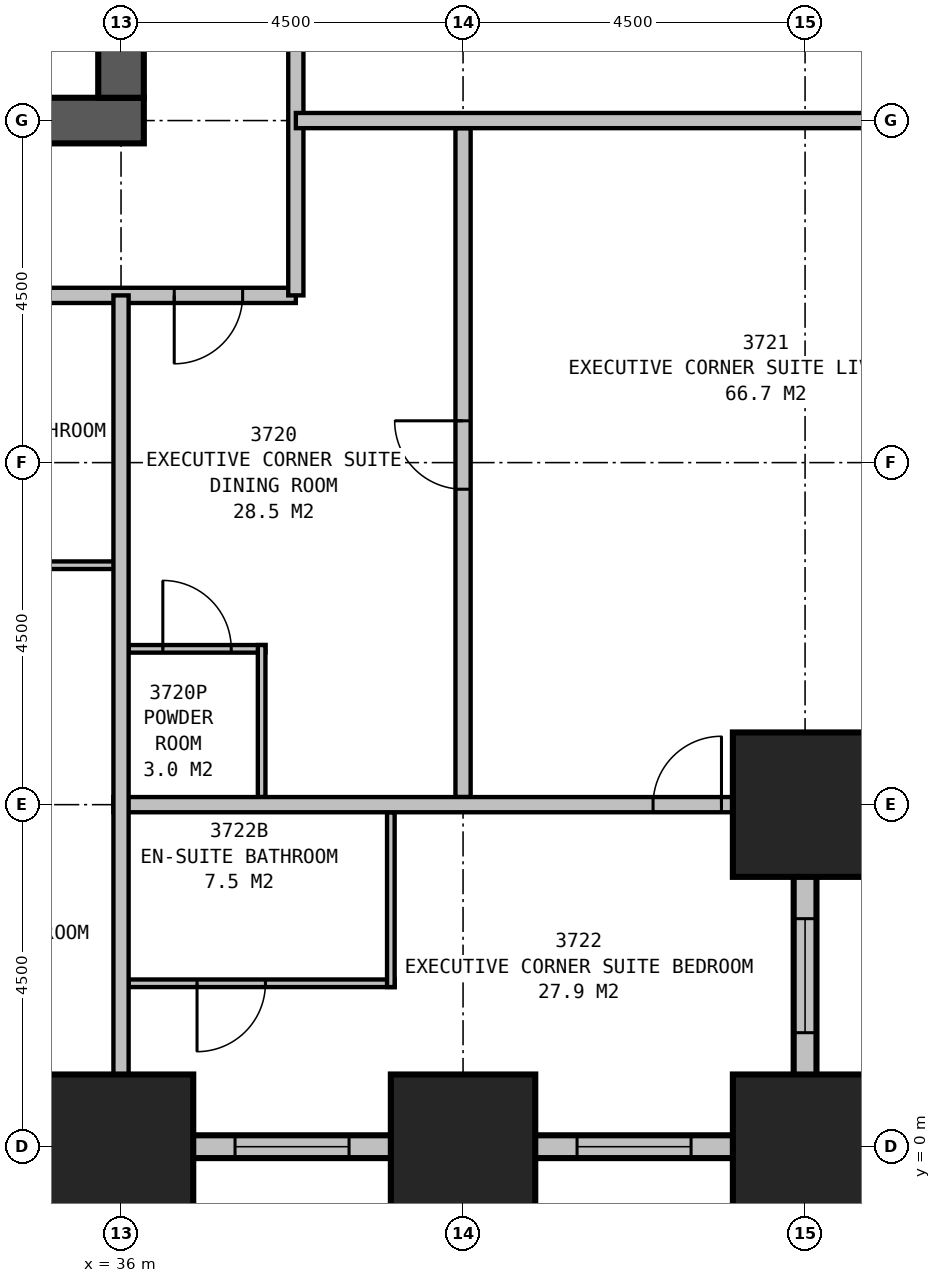
"""IFC4 building model, lengths in metres.
Left out: names, types, materials, properties, quantities, classifications, styles, units other than length and angle.
Written with IfcOpenShell. Run it as: python <this file> out.ifc"""

import sys

from ifc_helpers import new_model, si_unit, direction, frame, frame_2d, origin, origin_2d, place, context, subcontext, project, spatial, rectangle, extrude, element, fill, save


model = new_model("IFC4")
c1 = context("Model", 3, precision=1e-05, world=origin(), true_north=direction((0.0, 1.0)))
c2 = subcontext(c1, "Body", "Model", "MODEL_VIEW")
j1 = project(units=[si_unit("LENGTHUNIT", "METRE"), si_unit("PLANEANGLEUNIT", "RADIAN")], contexts=[c1])
p1 = place(None, origin())
s1 = spatial("IfcSite", under=j1, at=p1, CompositionType="ELEMENT")
p2 = place(p1, origin())
s2 = spatial("IfcBuilding", under=s1, at=p2, CompositionType="ELEMENT")
p3 = place(p2, frame((0.0, 0.0, 142.4)))
s3 = spatial("IfcBuildingStorey", under=s2, at=p3, CompositionType="ELEMENT", Elevation=142.4)
for number, where, z_axis, x_axis in (
    (1, (36.0, 0.0, 0.0), (0.0, 0.0, 1.0), (1.0, 0.0, 0.0)),
    (2, (40.5, 0.0, 0.0), (0.0, 0.0, 1.0), (1.0, 0.0, 0.0)),
    (3, (45.0, 0.0, 0.0), (0.0, 0.0, 1.0), (1.0, 0.0, 0.0)),
    (4, (45.0, 4.5, 0.0), (0.0, 0.0, 1.0), (1.0, 0.0, 0.0)),
):
    element("IfcColumn", number, at=place(p3, frame(where, z_axis=z_axis, x_axis=x_axis)), inside=s3, PredefinedType="COLUMN", context=c2, shape_type="SweptSolid", body=[
        extrude(rectangle(XDim=1.9, YDim=1.9, at=origin_2d()), origin(), (0.0, 0.0, 1.0), 3.5),
    ])
p4 = place(p3, frame((13.2, 13.5, 0.0), z_axis=(0.0, 0.0, 1.0), x_axis=(1.0, 0.0, 0.0)))
e5 = element("IfcWall", 5, at=p4, inside=s3, PredefinedType="SHEAR", context=c2, shape_type="SweptSolid", body=[
    extrude(rectangle(XDim=23.1, YDim=0.6, at=frame_2d((11.55, 0.0))), origin(), (0.0, 0.0, 1.0), 3.5),
])
p5 = place(p3, frame((36.0, 13.8, 0.0), z_axis=(0.0, 0.0, 1.0), x_axis=(0.0, 1.0, 0.0)))
e6 = element("IfcWall", 6, at=p5, inside=s3, PredefinedType="SHEAR", context=c2, shape_type="SweptSolid", body=[
    extrude(rectangle(XDim=2.7, YDim=0.6, at=frame_2d((1.35, 0.0))), origin(), (0.0, 0.0, 1.0), 3.5),
])
p6 = place(p3, frame((4.35, 0.0, 0.0), z_axis=(0.0, 0.0, 1.0), x_axis=(1.0, 0.0, 0.0)))
e7 = element("IfcWall", 7, at=p6, inside=s3, PredefinedType="STANDARD", context=c2, shape_type="SweptSolid", body=[
    extrude(rectangle(XDim=40.8, YDim=0.3, at=frame_2d((20.4, 0.0))), origin(), (0.0, 0.0, 1.0), 2.1),
])
p7 = place(p6, frame((1.65, 0.0, 0.5)))
e8 = element("IfcOpeningElement", 8, at=p7, cuts=e7, PredefinedType="OPENING", context=c2, shape_type="SweptSolid", body=[
    extrude(rectangle(XDim=1.5, YDim=1.4, at=frame_2d((0.75, 0.7))), frame((0.0, 0.16, 0.0), z_axis=(0.0, -1.0, 0.0), x_axis=(1.0, 0.0, 0.0)), (0.0, 0.0, 1.0), 0.32),
])
p8 = place(p6, frame((6.15, 0.0, 0.5)))
e9 = element("IfcOpeningElement", 9, at=p8, cuts=e7, PredefinedType="OPENING", context=c2, shape_type="SweptSolid", body=[
    extrude(rectangle(XDim=1.5, YDim=1.4, at=frame_2d((0.75, 0.7))), frame((0.0, 0.16, 0.0), z_axis=(0.0, -1.0, 0.0), x_axis=(1.0, 0.0, 0.0)), (0.0, 0.0, 1.0), 0.32),
])
p9 = place(p6, frame((10.65, 0.0, 0.5)))
e10 = element("IfcOpeningElement", 10, at=p9, cuts=e7, PredefinedType="OPENING", context=c2, shape_type="SweptSolid", body=[
    extrude(rectangle(XDim=1.5, YDim=1.4, at=frame_2d((0.75, 0.7))), frame((0.0, 0.16, 0.0), z_axis=(0.0, -1.0, 0.0), x_axis=(1.0, 0.0, 0.0)), (0.0, 0.0, 1.0), 0.32),
])
p10 = place(p6, frame((15.15, 0.0, 0.5)))
e11 = element("IfcOpeningElement", 11, at=p10, cuts=e7, PredefinedType="OPENING", context=c2, shape_type="SweptSolid", body=[
    extrude(rectangle(XDim=1.5, YDim=1.4, at=frame_2d((0.75, 0.7))), frame((0.0, 0.16, 0.0), z_axis=(0.0, -1.0, 0.0), x_axis=(1.0, 0.0, 0.0)), (0.0, 0.0, 1.0), 0.32),
])
p11 = place(p6, frame((19.65, 0.0, 0.5)))
e12 = element("IfcOpeningElement", 12, at=p11, cuts=e7, PredefinedType="OPENING", context=c2, shape_type="SweptSolid", body=[
    extrude(rectangle(XDim=1.5, YDim=1.4, at=frame_2d((0.75, 0.7))), frame((0.0, 0.16, 0.0), z_axis=(0.0, -1.0, 0.0), x_axis=(1.0, 0.0, 0.0)), (0.0, 0.0, 1.0), 0.32),
])
p12 = place(p6, frame((24.15, 0.0, 0.5)))
e13 = element("IfcOpeningElement", 13, at=p12, cuts=e7, PredefinedType="OPENING", context=c2, shape_type="SweptSolid", body=[
    extrude(rectangle(XDim=1.5, YDim=1.4, at=frame_2d((0.75, 0.7))), frame((0.0, 0.16, 0.0), z_axis=(0.0, -1.0, 0.0), x_axis=(1.0, 0.0, 0.0)), (0.0, 0.0, 1.0), 0.32),
])
p13 = place(p6, frame((28.65, 0.0, 0.5)))
e14 = element("IfcOpeningElement", 14, at=p13, cuts=e7, PredefinedType="OPENING", context=c2, shape_type="SweptSolid", body=[
    extrude(rectangle(XDim=1.5, YDim=1.4, at=frame_2d((0.75, 0.7))), frame((0.0, 0.16, 0.0), z_axis=(0.0, -1.0, 0.0), x_axis=(1.0, 0.0, 0.0)), (0.0, 0.0, 1.0), 0.32),
])
p14 = place(p6, frame((33.15, 0.0, 0.5)))
e15 = element("IfcOpeningElement", 15, at=p14, cuts=e7, PredefinedType="OPENING", context=c2, shape_type="SweptSolid", body=[
    extrude(rectangle(XDim=1.5, YDim=1.4, at=frame_2d((0.75, 0.7))), frame((0.0, 0.16, 0.0), z_axis=(0.0, -1.0, 0.0), x_axis=(1.0, 0.0, 0.0)), (0.0, 0.0, 1.0), 0.32),
])
p15 = place(p6, frame((37.65, 0.0, 0.5)))
e16 = element("IfcOpeningElement", 16, at=p15, cuts=e7, PredefinedType="OPENING", context=c2, shape_type="SweptSolid", body=[
    extrude(rectangle(XDim=1.5, YDim=1.4, at=frame_2d((0.75, 0.7))), frame((0.0, 0.16, 0.0), z_axis=(0.0, -1.0, 0.0), x_axis=(1.0, 0.0, 0.0)), (0.0, 0.0, 1.0), 0.32),
])
p16 = place(p3, frame((45.0, -0.15, 0.0), z_axis=(0.0, 0.0, 1.0), x_axis=(0.0, 1.0, 0.0)))
e17 = element("IfcWall", 17, at=p16, inside=s3, PredefinedType="STANDARD", context=c2, shape_type="SweptSolid", body=[
    extrude(rectangle(XDim=4.8, YDim=0.3, at=frame_2d((2.4, 0.0))), origin(), (0.0, 0.0, 1.0), 2.1),
])
p17 = place(p16, frame((1.65, 0.0, 0.5)))
e18 = element("IfcOpeningElement", 18, at=p17, cuts=e17, PredefinedType="OPENING", context=c2, shape_type="SweptSolid", body=[
    extrude(rectangle(XDim=1.5, YDim=1.4, at=frame_2d((0.75, 0.7))), frame((0.0, 0.16, 0.0), z_axis=(0.0, -1.0, 0.0), x_axis=(1.0, 0.0, 0.0)), (0.0, 0.0, 1.0), 0.32),
])
p18 = place(p3, frame((44.85, 4.5, 0.0), z_axis=(0.0, 0.0, 1.0), x_axis=(1.0, 0.0, 0.0)))
e19 = element("IfcWall", 19, at=p18, inside=s3, PredefinedType="STANDARD", context=c2, shape_type="SweptSolid", body=[
    extrude(rectangle(XDim=4.3, YDim=0.3, at=frame_2d((2.15, 0.0))), origin(), (0.0, 0.0, 1.0), 2.1),
])
p19 = place(p18, frame((1.4, 0.0, 0.5)))
e20 = element("IfcOpeningElement", 20, at=p19, cuts=e19, PredefinedType="OPENING", context=c2, shape_type="SweptSolid", body=[
    extrude(rectangle(XDim=1.5, YDim=1.4, at=frame_2d((0.75, 0.7))), frame((0.0, 0.16, 0.0), z_axis=(0.0, -1.0, 0.0), x_axis=(1.0, 0.0, 0.0)), (0.0, 0.0, 1.0), 0.32),
])
p20 = place(p3, frame((49.017, 4.351, 0.0), z_axis=(0.0, 0.0, 1.0), x_axis=(-0.110433201132, 0.993883548555, 0.0)))
e21 = element("IfcWall", 21, at=p20, inside=s3, PredefinedType="STANDARD", context=c2, shape_type="SweptSolid", body=[
    extrude(rectangle(XDim=31.994, YDim=0.3, at=frame_2d((15.997, 0.0))), origin(), (0.0, 0.0, 1.0), 2.1),
])
p21 = place(p20, frame((1.664, 0.0, 0.5)))
e22 = element("IfcOpeningElement", 22, at=p21, cuts=e21, PredefinedType="OPENING", context=c2, shape_type="SweptSolid", body=[
    extrude(rectangle(XDim=1.5, YDim=1.4, at=frame_2d((0.75, 0.7))), frame((0.0, 0.16, 0.0), z_axis=(0.0, -1.0, 0.0), x_axis=(1.0, 0.0, 0.0)), (0.0, 0.0, 1.0), 0.32),
])
p22 = place(p20, frame((6.192, 0.0, 0.5)))
e23 = element("IfcOpeningElement", 23, at=p22, cuts=e21, PredefinedType="OPENING", context=c2, shape_type="SweptSolid", body=[
    extrude(rectangle(XDim=1.5, YDim=1.4, at=frame_2d((0.75, 0.7))), frame((0.0, 0.16, 0.0), z_axis=(0.0, -1.0, 0.0), x_axis=(1.0, 0.0, 0.0)), (0.0, 0.0, 1.0), 0.32),
])
p23 = place(p20, frame((10.719, 0.0, 0.5)))
e24 = element("IfcOpeningElement", 24, at=p23, cuts=e21, PredefinedType="OPENING", context=c2, shape_type="SweptSolid", body=[
    extrude(rectangle(XDim=1.5, YDim=1.4, at=frame_2d((0.75, 0.7))), frame((0.0, 0.16, 0.0), z_axis=(0.0, -1.0, 0.0), x_axis=(1.0, 0.0, 0.0)), (0.0, 0.0, 1.0), 0.32),
])
p24 = place(p20, frame((15.247, 0.0, 0.5)))
e25 = element("IfcOpeningElement", 25, at=p24, cuts=e21, PredefinedType="OPENING", context=c2, shape_type="SweptSolid", body=[
    extrude(rectangle(XDim=1.5, YDim=1.4, at=frame_2d((0.75, 0.7))), frame((0.0, 0.16, 0.0), z_axis=(0.0, -1.0, 0.0), x_axis=(1.0, 0.0, 0.0)), (0.0, 0.0, 1.0), 0.32),
])
p25 = place(p20, frame((19.775, 0.0, 0.5)))
e26 = element("IfcOpeningElement", 26, at=p25, cuts=e21, PredefinedType="OPENING", context=c2, shape_type="SweptSolid", body=[
    extrude(rectangle(XDim=1.5, YDim=1.4, at=frame_2d((0.75, 0.7))), frame((0.0, 0.16, 0.0), z_axis=(0.0, -1.0, 0.0), x_axis=(1.0, 0.0, 0.0)), (0.0, 0.0, 1.0), 0.32),
])
p26 = place(p20, frame((24.302, 0.0, 0.5)))
e27 = element("IfcOpeningElement", 27, at=p26, cuts=e21, PredefinedType="OPENING", context=c2, shape_type="SweptSolid", body=[
    extrude(rectangle(XDim=1.5, YDim=1.4, at=frame_2d((0.75, 0.7))), frame((0.0, 0.16, 0.0), z_axis=(0.0, -1.0, 0.0), x_axis=(1.0, 0.0, 0.0)), (0.0, 0.0, 1.0), 0.32),
])
p27 = place(p20, frame((28.83, 0.0, 0.5)))
e28 = element("IfcOpeningElement", 28, at=p27, cuts=e21, PredefinedType="OPENING", context=c2, shape_type="SweptSolid", body=[
    extrude(rectangle(XDim=1.5, YDim=1.4, at=frame_2d((0.75, 0.7))), frame((0.0, 0.16, 0.0), z_axis=(0.0, -1.0, 0.0), x_axis=(1.0, 0.0, 0.0)), (0.0, 0.0, 1.0), 0.32),
])
p28 = place(p3, frame((11.2, 11.2, 0.0), z_axis=(0.0, 0.0, 1.0), x_axis=(1.0, 0.0, 0.0)))
e29 = element("IfcWall", 29, at=p28, inside=s3, PredefinedType="PARTITIONING", context=c2, shape_type="SweptSolid", body=[
    extrude(rectangle(XDim=27.1, YDim=0.2, at=frame_2d((13.55, 0.0))), origin(), (0.0, 0.0, 1.0), 3.25),
])
p29 = place(p28, frame((4.05, 0.0, 0.0), z_axis=(0.0, 0.0, 1.0), x_axis=(-1.0, 0.0, 0.0)))
e30 = element("IfcOpeningElement", 30, at=p29, cuts=e29, PredefinedType="OPENING", context=c2, shape_type="SweptSolid", body=[
    extrude(rectangle(XDim=0.9, YDim=2.1, at=frame_2d((0.45, 1.05))), frame((0.0, 0.11, 0.0), z_axis=(0.0, -1.0, 0.0), x_axis=(1.0, 0.0, 0.0)), (0.0, 0.0, 1.0), 0.22),
])
p30 = place(p28, frame((12.65, 0.0, 0.0), z_axis=(0.0, 0.0, 1.0), x_axis=(-1.0, 0.0, 0.0)))
e31 = element("IfcOpeningElement", 31, at=p30, cuts=e29, PredefinedType="OPENING", context=c2, shape_type="SweptSolid", body=[
    extrude(rectangle(XDim=1.0, YDim=2.1, at=frame_2d((0.5, 1.05))), frame((0.0, 0.11, 0.0), z_axis=(0.0, -1.0, 0.0), x_axis=(1.0, 0.0, 0.0)), (0.0, 0.0, 1.0), 0.22),
])
p31 = place(p28, frame((19.45, 0.0, 0.0), z_axis=(0.0, 0.0, 1.0), x_axis=(-1.0, 0.0, 0.0)))
e32 = element("IfcOpeningElement", 32, at=p31, cuts=e29, PredefinedType="OPENING", context=c2, shape_type="SweptSolid", body=[
    extrude(rectangle(XDim=0.9, YDim=2.1, at=frame_2d((0.45, 1.05))), frame((0.0, 0.11, 0.0), z_axis=(0.0, -1.0, 0.0), x_axis=(1.0, 0.0, 0.0)), (0.0, 0.0, 1.0), 0.22),
])
p32 = place(p28, frame((1.6, 0.0, 0.0), z_axis=(0.0, 0.0, 1.0), x_axis=(-1.0, 0.0, 0.0)))
e33 = element("IfcOpeningElement", 33, at=p32, cuts=e29, PredefinedType="OPENING", context=c2, shape_type="SweptSolid", body=[
    extrude(rectangle(XDim=0.9, YDim=2.1, at=frame_2d((0.45, 1.05))), frame((0.0, 0.11, 0.0), z_axis=(0.0, -1.0, 0.0), x_axis=(1.0, 0.0, 0.0)), (0.0, 0.0, 1.0), 0.22),
])
p33 = place(p28, frame((26.4, 0.0, 0.0), z_axis=(0.0, 0.0, 1.0), x_axis=(-1.0, 0.0, 0.0)))
e34 = element("IfcOpeningElement", 34, at=p33, cuts=e29, PredefinedType="OPENING", context=c2, shape_type="SweptSolid", body=[
    extrude(rectangle(XDim=0.9, YDim=2.1, at=frame_2d((0.45, 1.05))), frame((0.0, 0.11, 0.0), z_axis=(0.0, -1.0, 0.0), x_axis=(1.0, 0.0, 0.0)), (0.0, 0.0, 1.0), 0.22),
])
p34 = place(p3, frame((38.3, 11.2, 0.0), z_axis=(0.0, 0.0, 1.0), x_axis=(0.0, 1.0, 0.0)))
e35 = element("IfcWall", 35, at=p34, inside=s3, PredefinedType="PARTITIONING", context=c2, shape_type="SweptSolid", body=[
    extrude(rectangle(XDim=18.1, YDim=0.2, at=frame_2d((9.05, 0.0))), origin(), (0.0, 0.0, 1.0), 3.25),
])
p35 = place(p34, frame((5.0, 0.0, 0.0), z_axis=(0.0, 0.0, 1.0), x_axis=(-1.0, 0.0, 0.0)))
e36 = element("IfcOpeningElement", 36, at=p35, cuts=e35, PredefinedType="OPENING", context=c2, shape_type="SweptSolid", body=[
    extrude(rectangle(XDim=1.0, YDim=2.1, at=frame_2d((0.5, 1.05))), frame((0.0, 0.11, 0.0), z_axis=(0.0, -1.0, 0.0), x_axis=(1.0, 0.0, 0.0)), (0.0, 0.0, 1.0), 0.22),
])
p36 = place(p34, frame((8.55, 0.0, 0.0), z_axis=(0.0, 0.0, 1.0), x_axis=(-1.0, 0.0, 0.0)))
e37 = element("IfcOpeningElement", 37, at=p36, cuts=e35, PredefinedType="OPENING", context=c2, shape_type="SweptSolid", body=[
    extrude(rectangle(XDim=0.9, YDim=2.1, at=frame_2d((0.45, 1.05))), frame((0.0, 0.11, 0.0), z_axis=(0.0, -1.0, 0.0), x_axis=(1.0, 0.0, 0.0)), (0.0, 0.0, 1.0), 0.22),
])
p37 = place(p3, frame((33.0, 7.65, 0.0), z_axis=(0.0, 0.0, 1.0), x_axis=(1.0, 0.0, 0.0)))
e38 = element("IfcWall", 38, at=p37, inside=s3, PredefinedType="PLUMBINGWALL", context=c2, shape_type="SweptSolid", body=[
    extrude(rectangle(XDim=3.0, YDim=0.1, at=frame_2d((1.5, 0.0))), origin(), (0.0, 0.0, 1.0), 3.25),
])
p38 = place(p3, frame((38.3, 13.5, 0.0), z_axis=(0.0, 0.0, 1.0), x_axis=(1.0, 0.0, 0.0)))
e39 = element("IfcWall", 39, at=p38, inside=s3, PredefinedType="PARTITIONING", context=c2, shape_type="SweptSolid", body=[
    extrude(rectangle(XDim=9.921, YDim=0.2, at=frame_2d((4.96, 0.0))), origin(), (0.0, 0.0, 1.0), 1.9),
])
p39 = place(p3, frame((36.0, 11.2, 0.0), z_axis=(0.0, 0.0, 1.0), x_axis=(0.0, -1.0, 0.0)))
e40 = element("IfcWall", 40, at=p39, inside=s3, PredefinedType="PARTITIONING", context=c2, shape_type="SweptSolid", body=[
    extrude(rectangle(XDim=11.2, YDim=0.2, at=frame_2d((5.6, 0.0))), origin(), (0.0, 0.0, 1.0), 2.2),
])
p40 = place(p3, frame((35.9, 4.5, 0.0), z_axis=(0.0, 0.0, 1.0), x_axis=(1.0, 0.0, 0.0)))
e41 = element("IfcWall", 41, at=p40, inside=s3, PredefinedType="PARTITIONING", context=c2, shape_type="SweptSolid", body=[
    extrude(rectangle(XDim=9.1, YDim=0.2, at=frame_2d((4.55, 0.0))), origin(), (0.0, 0.0, 1.0), 3.25),
])
p41 = place(p40, frame((7.1, 0.0, 0.0)))
e42 = element("IfcOpeningElement", 42, at=p41, cuts=e41, PredefinedType="OPENING", context=c2, shape_type="SweptSolid", body=[
    extrude(rectangle(XDim=0.9, YDim=2.1, at=frame_2d((0.45, 1.05))), frame((0.0, 0.11, 0.0), z_axis=(0.0, -1.0, 0.0), x_axis=(1.0, 0.0, 0.0)), (0.0, 0.0, 1.0), 0.22),
])
p42 = place(p3, frame((40.5, 4.6, 0.0), z_axis=(0.0, 0.0, 1.0), x_axis=(0.0, 1.0, 0.0)))
e43 = element("IfcWall", 43, at=p42, inside=s3, PredefinedType="PARTITIONING", context=c2, shape_type="SweptSolid", body=[
    extrude(rectangle(XDim=8.8, YDim=0.2, at=frame_2d((4.4, 0.0))), origin(), (0.0, 0.0, 1.0), 2.2),
])
p43 = place(p42, frame((4.05, 0.0, 0.0)))
e44 = element("IfcOpeningElement", 44, at=p43, cuts=e43, PredefinedType="OPENING", context=c2, shape_type="SweptSolid", body=[
    extrude(rectangle(XDim=0.9, YDim=2.1, at=frame_2d((0.45, 1.05))), frame((0.0, 0.11, 0.0), z_axis=(0.0, -1.0, 0.0), x_axis=(1.0, 0.0, 0.0)), (0.0, 0.0, 1.0), 0.22),
])
p44 = place(p3, frame((37.85, 4.6, 0.0), z_axis=(0.0, 0.0, 1.0), x_axis=(0.0, 1.0, 0.0)))
e45 = element("IfcWall", 45, at=p44, inside=s3, PredefinedType="PLUMBINGWALL", context=c2, shape_type="SweptSolid", body=[
    extrude(rectangle(XDim=2.0, YDim=0.1, at=frame_2d((1.0, 0.0))), origin(), (0.0, 0.0, 1.0), 3.25),
])
p45 = place(p3, frame((36.1, 6.55, 0.0), z_axis=(0.0, 0.0, 1.0), x_axis=(1.0, 0.0, 0.0)))
e46 = element("IfcWall", 46, at=p45, inside=s3, PredefinedType="PLUMBINGWALL", context=c2, shape_type="SweptSolid", body=[
    extrude(rectangle(XDim=1.8, YDim=0.1, at=frame_2d((0.9, 0.0))), origin(), (0.0, 0.0, 1.0), 3.25),
])
p46 = place(p45, frame((0.45, 0.0, 0.0)))
e47 = element("IfcOpeningElement", 47, at=p46, cuts=e46, PredefinedType="OPENING", context=c2, shape_type="SweptSolid", body=[
    extrude(rectangle(XDim=0.9, YDim=2.1, at=frame_2d((0.45, 1.05))), frame((0.0, 0.06, 0.0), z_axis=(0.0, -1.0, 0.0), x_axis=(1.0, 0.0, 0.0)), (0.0, 0.0, 1.0), 0.12),
])
p47 = place(p3, frame((39.55, 4.4, 0.0), z_axis=(0.0, 0.0, 1.0), x_axis=(0.0, -1.0, 0.0)))
e48 = element("IfcWall", 48, at=p47, inside=s3, PredefinedType="PLUMBINGWALL", context=c2, shape_type="SweptSolid", body=[
    extrude(rectangle(XDim=2.3, YDim=0.1, at=frame_2d((1.15, 0.0))), origin(), (0.0, 0.0, 1.0), 3.25),
])
p48 = place(p3, frame((36.1, 2.15, 0.0), z_axis=(0.0, 0.0, 1.0), x_axis=(1.0, 0.0, 0.0)))
e49 = element("IfcWall", 49, at=p48, inside=s3, PredefinedType="PLUMBINGWALL", context=c2, shape_type="SweptSolid", body=[
    extrude(rectangle(XDim=3.5, YDim=0.1, at=frame_2d((1.75, 0.0))), origin(), (0.0, 0.0, 1.0), 3.25),
])
p49 = place(p48, frame((1.8, 0.0, 0.0), z_axis=(0.0, 0.0, 1.0), x_axis=(-1.0, 0.0, 0.0)))
e50 = element("IfcOpeningElement", 50, at=p49, cuts=e49, PredefinedType="OPENING", context=c2, shape_type="SweptSolid", body=[
    extrude(rectangle(XDim=0.9, YDim=2.1, at=frame_2d((0.45, 1.05))), frame((0.0, 0.06, 0.0), z_axis=(0.0, -1.0, 0.0), x_axis=(1.0, 0.0, 0.0)), (0.0, 0.0, 1.0), 0.12),
])
p50 = place(p14, origin())
e51 = element("IfcWindow", 51, at=p50, inside=s3, PartitioningType="SINGLE_PANEL", PredefinedType="WINDOW", context=c2, shape_type="SweptSolid", body=[
    extrude(rectangle(XDim=1.5, YDim=1.4, at=frame_2d((0.75, 0.7))), frame((0.0, 0.03, 0.0), z_axis=(0.0, -1.0, 0.0), x_axis=(1.0, 0.0, 0.0)), (0.0, 0.0, 1.0), 0.06),
])
fill(e15, e51)
p51 = place(p15, origin())
e52 = element("IfcWindow", 52, at=p51, inside=s3, PartitioningType="SINGLE_PANEL", PredefinedType="WINDOW", context=c2, shape_type="SweptSolid", body=[
    extrude(rectangle(XDim=1.5, YDim=1.4, at=frame_2d((0.75, 0.7))), frame((0.0, 0.03, 0.0), z_axis=(0.0, -1.0, 0.0), x_axis=(1.0, 0.0, 0.0)), (0.0, 0.0, 1.0), 0.06),
])
fill(e16, e52)
p52 = place(p17, origin())
e53 = element("IfcWindow", 53, at=p52, inside=s3, PartitioningType="SINGLE_PANEL", PredefinedType="WINDOW", context=c2, shape_type="SweptSolid", body=[
    extrude(rectangle(XDim=1.5, YDim=1.4, at=frame_2d((0.75, 0.7))), frame((0.0, 0.03, 0.0), z_axis=(0.0, -1.0, 0.0), x_axis=(1.0, 0.0, 0.0)), (0.0, 0.0, 1.0), 0.06),
])
fill(e18, e53)
p53 = place(p33, origin())
e54 = element("IfcDoor", 54, at=p53, inside=s3, OperationType="SINGLE_SWING_RIGHT", PredefinedType="DOOR", context=c2, shape_type="SweptSolid", body=[
    extrude(rectangle(XDim=0.9, YDim=2.1, at=frame_2d((0.45, 1.05))), frame((0.0, 0.025, 0.0), z_axis=(0.0, -1.0, 0.0), x_axis=(1.0, 0.0, 0.0)), (0.0, 0.0, 1.0), 0.05),
])
fill(e34, e54)
p54 = place(p41, origin())
e55 = element("IfcDoor", 55, at=p54, inside=s3, OperationType="SINGLE_SWING_RIGHT", PredefinedType="DOOR", context=c2, shape_type="SweptSolid", body=[
    extrude(rectangle(XDim=0.9, YDim=2.1, at=frame_2d((0.45, 1.05))), frame((0.0, 0.025, 0.0), z_axis=(0.0, -1.0, 0.0), x_axis=(1.0, 0.0, 0.0)), (0.0, 0.0, 1.0), 0.05),
])
fill(e42, e55)
p55 = place(p43, origin())
e56 = element("IfcDoor", 56, at=p55, inside=s3, OperationType="SINGLE_SWING_RIGHT", PredefinedType="DOOR", context=c2, shape_type="SweptSolid", body=[
    extrude(rectangle(XDim=0.9, YDim=2.1, at=frame_2d((0.45, 1.05))), frame((0.0, 0.025, 0.0), z_axis=(0.0, -1.0, 0.0), x_axis=(1.0, 0.0, 0.0)), (0.0, 0.0, 1.0), 0.05),
])
fill(e44, e56)
p56 = place(p46, origin())
e57 = element("IfcDoor", 57, at=p56, inside=s3, OperationType="SINGLE_SWING_LEFT", PredefinedType="DOOR", context=c2, shape_type="SweptSolid", body=[
    extrude(rectangle(XDim=0.9, YDim=2.1, at=frame_2d((0.45, 1.05))), frame((0.0, 0.025, 0.0), z_axis=(0.0, -1.0, 0.0), x_axis=(1.0, 0.0, 0.0)), (0.0, 0.0, 1.0), 0.05),
])
fill(e47, e57)
p57 = place(p49, origin())
e58 = element("IfcDoor", 58, at=p57, inside=s3, OperationType="SINGLE_SWING_RIGHT", PredefinedType="DOOR", context=c2, shape_type="SweptSolid", body=[
    extrude(rectangle(XDim=0.9, YDim=2.1, at=frame_2d((0.45, 1.05))), frame((0.0, 0.025, 0.0), z_axis=(0.0, -1.0, 0.0), x_axis=(1.0, 0.0, 0.0)), (0.0, 0.0, 1.0), 0.05),
])
fill(e50, e58)
save(model, sys.argv[1])
